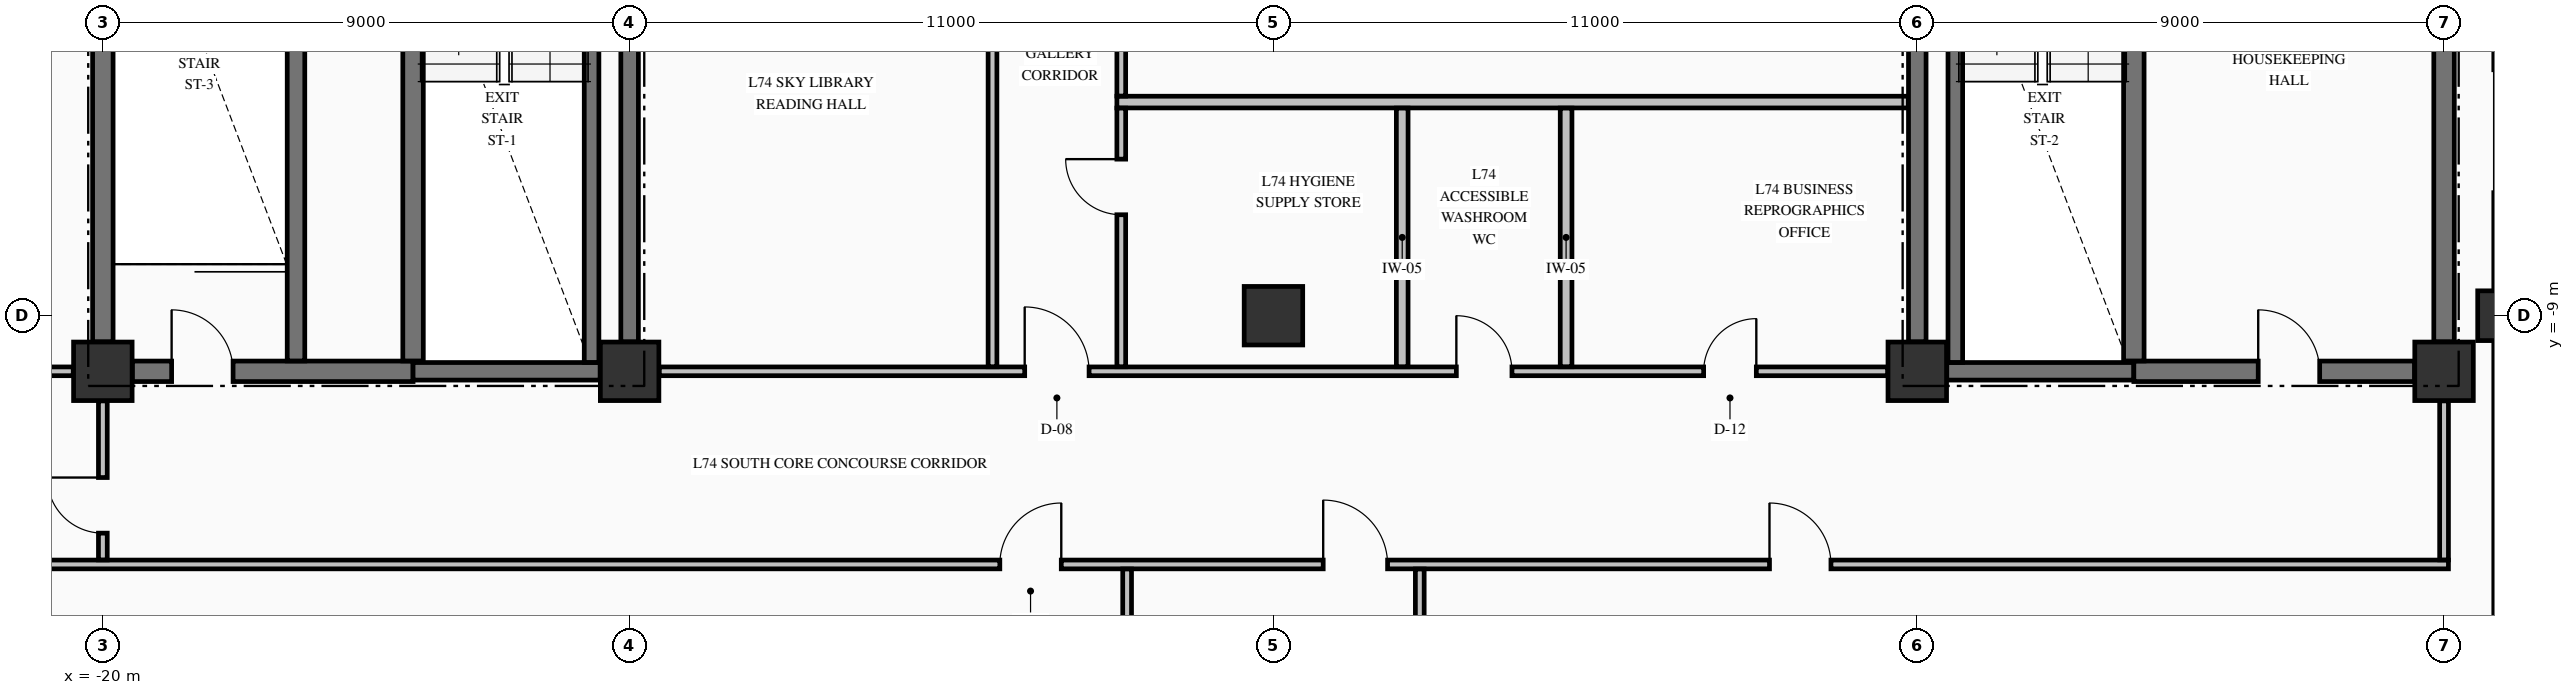
"""IFC4 building model, lengths in metres.
Left out: names, types, materials, properties, quantities, classifications, styles, units other than length and angle.
Written with IfcOpenShell. Run it as: python <this file> out.ifc"""

import sys

from ifc_helpers import new_model, si_unit, direction, frame, frame_2d, origin, origin_2d, place, context, subcontext, project, spatial, rectangle, extrude, element, fill, save


model = new_model("IFC4")
c1 = context("Model", 3, precision=1e-05, world=origin(), true_north=direction((0.0, 1.0)))
c2 = subcontext(c1, "Body", "Model", "MODEL_VIEW")
j1 = project(units=[si_unit("LENGTHUNIT", "METRE"), si_unit("PLANEANGLEUNIT", "RADIAN")], contexts=[c1])
p1 = place(None, origin())
s1 = spatial("IfcSite", under=j1, at=p1, CompositionType="ELEMENT")
p2 = place(p1, origin())
s2 = spatial("IfcBuilding", under=s1, at=p2, CompositionType="ELEMENT")
p3 = place(p2, frame((0.0, 0.0, 278.06)))
s3 = spatial("IfcBuildingStorey", under=s2, at=p3, CompositionType="ELEMENT", Elevation=278.06)
p4 = place(p3, frame((21.0, -9.0, -0.425), z_axis=(0.0, 0.0, 1.0), x_axis=(1.0, 0.0, 0.0)))
e1 = element("IfcColumn", 1, at=p4, inside=s3, PredefinedType="COLUMN", context=c2, shape_type="SweptSolid", body=[
    extrude(rectangle(XDim=0.85, YDim=0.85, at=origin_2d()), origin(), (0.0, 0.0, 1.0), 3.84),
])
for number, where, z_axis, x_axis in (
    (2, (-20.0, -9.95, -0.425), (0.0, 0.0, 1.0), (1.0, 0.0, 0.0)),
    (3, (-11.0, -9.95, -0.425), (0.0, 0.0, 1.0), (1.0, 0.0, 0.0)),
    (4, (11.0, -9.95, -0.425), (0.0, 0.0, 1.0), (1.0, 0.0, 0.0)),
    (5, (20.0, -9.95, -0.425), (0.0, 0.0, 1.0), (1.0, 0.0, 0.0)),
    (6, (0.0, -9.0, -0.425), (0.0, 0.0, 1.0), (1.0, 0.0, 0.0)),
):
    element("IfcColumn", number, at=place(p3, frame(where, z_axis=z_axis, x_axis=x_axis)), inside=s3, PredefinedType="COLUMN", context=c2, shape_type="SweptSolid", body=[
        extrude(rectangle(XDim=1.0, YDim=1.0, at=origin_2d()), origin(), (0.0, 0.0, 1.0), 3.84),
    ])
p5 = place(p3, frame((21.0, -17.545, 0.0), z_axis=(0.0, 0.0, 1.0), x_axis=(0.0, 1.0, 0.0)))
e7 = element("IfcWall", 7, at=p5, inside=s3, PredefinedType="STANDARD", context=c2, shape_type="SweptSolid", body=[
    extrude(rectangle(XDim=8.09, YDim=0.3, at=frame_2d((4.045, 0.0))), origin(), (0.0, 0.0, 1.0), 1.607),
])
p6 = place(p3, frame((21.0, -8.545, 0.0), z_axis=(0.0, 0.0, 1.0), x_axis=(0.0, 1.0, 0.0)))
e8 = element("IfcWall", 8, at=p6, inside=s3, PredefinedType="STANDARD", context=c2, shape_type="SweptSolid", body=[
    extrude(rectangle(XDim=8.09, YDim=0.3, at=frame_2d((4.045, 0.0))), origin(), (0.0, 0.0, 1.0), 2.807),
])
p7 = place(p6, frame((1.647, 0.0, 0.7)))
e9 = element("IfcOpeningElement", 9, at=p7, cuts=e8, PredefinedType="OPENING", context=c2, shape_type="SweptSolid", body=[
    extrude(rectangle(XDim=2.1, YDim=1.5, at=frame_2d((1.05, 0.75))), frame((0.0, 0.16, 0.0), z_axis=(0.0, -1.0, 0.0), x_axis=(1.0, 0.0, 0.0)), (0.0, 0.0, 1.0), 0.32),
])
p8 = place(p6, frame((4.343, 0.0, 0.7)))
e10 = element("IfcOpeningElement", 10, at=p8, cuts=e8, PredefinedType="OPENING", context=c2, shape_type="SweptSolid", body=[
    extrude(rectangle(XDim=2.1, YDim=1.5, at=frame_2d((1.05, 0.75))), frame((0.0, 0.16, 0.0), z_axis=(0.0, -1.0, 0.0), x_axis=(1.0, 0.0, 0.0)), (0.0, 0.0, 1.0), 0.32),
])
p9 = place(p3, frame((-19.496, -9.95, 0.0), z_axis=(0.0, 0.0, 1.0), x_axis=(1.0, 0.0, 0.0)))
e11 = element("IfcWall", 11, at=p9, inside=s3, PredefinedType="SHEAR", context=c2, shape_type="SweptSolid", body=[
    extrude(rectangle(XDim=4.796, YDim=0.35, at=frame_2d((2.398, 0.0))), origin(), (0.0, 0.0, 1.0), 3.415),
])
p10 = place(p9, frame((0.671, 0.0, 0.0)))
e12 = element("IfcOpeningElement", 12, at=p10, cuts=e11, PredefinedType="OPENING", context=c2, shape_type="SweptSolid", body=[
    extrude(rectangle(XDim=1.05, YDim=2.15, at=frame_2d((0.525, 1.075))), frame((0.0, 0.185, 0.0), z_axis=(0.0, -1.0, 0.0), x_axis=(1.0, 0.0, 0.0)), (0.0, 0.0, 1.0), 0.37),
])
for number, where, z_axis, x_axis in (
    (13, (-14.7, -9.95, 0.0), (0.0, 0.0, 1.0), (1.0, 0.0, 0.0)),
    (14, (11.504, -9.95, 0.0), (0.0, 0.0, 1.0), (1.0, 0.0, 0.0)),
):
    element("IfcWall", number, at=place(p3, frame(where, z_axis=z_axis, x_axis=x_axis)), inside=s3, PredefinedType="SHEAR", context=c2, shape_type="SweptSolid", body=[
        extrude(rectangle(XDim=3.196, YDim=0.3, at=frame_2d((1.598, 0.0))), origin(), (0.0, 0.0, 1.0), 3.415),
    ])
p11 = place(p3, frame((14.7, -9.95, 0.0), z_axis=(0.0, 0.0, 1.0), x_axis=(1.0, 0.0, 0.0)))
e15 = element("IfcWall", 15, at=p11, inside=s3, PredefinedType="SHEAR", context=c2, shape_type="SweptSolid", body=[
    extrude(rectangle(XDim=4.796, YDim=0.35, at=frame_2d((2.398, 0.0))), origin(), (0.0, 0.0, 1.0), 3.415),
])
p12 = place(p11, frame((2.125, 0.0, 0.0)))
e16 = element("IfcOpeningElement", 16, at=p12, cuts=e15, PredefinedType="OPENING", context=c2, shape_type="SweptSolid", body=[
    extrude(rectangle(XDim=1.05, YDim=2.15, at=frame_2d((0.525, 1.075))), frame((0.0, 0.185, 0.0), z_axis=(0.0, -1.0, 0.0), x_axis=(1.0, 0.0, 0.0)), (0.0, 0.0, 1.0), 0.37),
])
p13 = place(p3, frame((-25.835, -13.25, 0.0), z_axis=(0.0, 0.0, 1.0), x_axis=(1.0, 0.0, 0.0)))
e17 = element("IfcWall", 17, at=p13, inside=s3, PredefinedType="PARTITIONING", context=c2, shape_type="SweptSolid", body=[
    extrude(rectangle(XDim=45.91, YDim=0.15, at=frame_2d((22.955, 0.0))), origin(), (0.0, 0.0, 1.0), 3.415),
])
p14 = place(p13, frame((26.685, 0.0, 0.0)))
e18 = element("IfcOpeningElement", 18, at=p14, cuts=e17, PredefinedType="OPENING", context=c2, shape_type="SweptSolid", body=[
    extrude(rectangle(XDim=1.1, YDim=2.15, at=frame_2d((0.55, 1.075))), frame((0.0, 0.085, 0.0), z_axis=(0.0, -1.0, 0.0), x_axis=(1.0, 0.0, 0.0)), (0.0, 0.0, 1.0), 0.17),
])
p15 = place(p13, frame((21.16, 0.0, 0.0)))
e19 = element("IfcOpeningElement", 19, at=p15, cuts=e17, PredefinedType="OPENING", context=c2, shape_type="SweptSolid", body=[
    extrude(rectangle(XDim=1.05, YDim=2.15, at=frame_2d((0.525, 1.075))), frame((0.0, 0.085, 0.0), z_axis=(0.0, -1.0, 0.0), x_axis=(1.0, 0.0, 0.0)), (0.0, 0.0, 1.0), 0.17),
])
p16 = place(p13, frame((34.31, 0.0, 0.0)))
e20 = element("IfcOpeningElement", 20, at=p16, cuts=e17, PredefinedType="OPENING", context=c2, shape_type="SweptSolid", body=[
    extrude(rectangle(XDim=1.05, YDim=2.15, at=frame_2d((0.525, 1.075))), frame((0.0, 0.085, 0.0), z_axis=(0.0, -1.0, 0.0), x_axis=(1.0, 0.0, 0.0)), (0.0, 0.0, 1.0), 0.17),
])
p17 = place(p3, frame((-25.835, -9.95, 0.0), z_axis=(0.0, 0.0, 1.0), x_axis=(1.0, 0.0, 0.0)))
e21 = element("IfcWall", 21, at=p17, inside=s3, PredefinedType="PARTITIONING", context=c2, shape_type="SweptSolid", body=[
    extrude(rectangle(XDim=5.329, YDim=0.15, at=frame_2d((2.665, 0.0))), origin(), (0.0, 0.0, 1.0), 3.415),
])
p18 = place(p17, frame((2.36, 0.0, 0.0)))
e22 = element("IfcOpeningElement", 22, at=p18, cuts=e21, PredefinedType="OPENING", context=c2, shape_type="SweptSolid", body=[
    extrude(rectangle(XDim=0.95, YDim=2.15, at=frame_2d((0.475, 1.075))), frame((0.0, 0.085, 0.0), z_axis=(0.0, -1.0, 0.0), x_axis=(1.0, 0.0, 0.0)), (0.0, 0.0, 1.0), 0.17),
])
p19 = place(p3, frame((-10.494, -9.95, 0.0), z_axis=(0.0, 0.0, 1.0), x_axis=(1.0, 0.0, 0.0)))
e23 = element("IfcWall", 23, at=p19, inside=s3, PredefinedType="PARTITIONING", context=c2, shape_type="SweptSolid", body=[
    extrude(rectangle(XDim=20.988, YDim=0.15, at=frame_2d((10.494, 0.0))), origin(), (0.0, 0.0, 1.0), 3.415),
])
p20 = place(p19, frame((6.244, 0.0, 0.0)))
e24 = element("IfcOpeningElement", 24, at=p20, cuts=e23, PredefinedType="OPENING", context=c2, shape_type="SweptSolid", body=[
    extrude(rectangle(XDim=1.1, YDim=2.15, at=frame_2d((0.55, 1.075))), frame((0.0, 0.085, 0.0), z_axis=(0.0, -1.0, 0.0), x_axis=(1.0, 0.0, 0.0)), (0.0, 0.0, 1.0), 0.17),
])
p21 = place(p19, frame((13.619, 0.0, 0.0)))
e25 = element("IfcOpeningElement", 25, at=p21, cuts=e23, PredefinedType="OPENING", context=c2, shape_type="SweptSolid", body=[
    extrude(rectangle(XDim=0.95, YDim=2.15, at=frame_2d((0.475, 1.075))), frame((0.0, 0.085, 0.0), z_axis=(0.0, -1.0, 0.0), x_axis=(1.0, 0.0, 0.0)), (0.0, 0.0, 1.0), 0.17),
])
p22 = place(p19, frame((17.844, 0.0, 0.0)))
e26 = element("IfcOpeningElement", 26, at=p22, cuts=e23, PredefinedType="OPENING", context=c2, shape_type="SweptSolid", body=[
    extrude(rectangle(XDim=0.9, YDim=2.15, at=frame_2d((0.45, 1.075))), frame((0.0, 0.085, 0.0), z_axis=(0.0, -1.0, 0.0), x_axis=(1.0, 0.0, 0.0)), (0.0, 0.0, 1.0), 0.17),
])
p23 = place(p3, frame((-2.675, -5.35, 0.0), z_axis=(0.0, 0.0, 1.0), x_axis=(1.0, 0.0, 0.0)))
e27 = element("IfcWall", 27, at=p23, inside=s3, PredefinedType="PARTITIONING", context=c2, shape_type="SweptSolid", body=[
    extrude(rectangle(XDim=13.522, YDim=0.2, at=frame_2d((6.761, 0.0))), origin(), (0.0, 0.0, 1.0), 3.415),
])
p24 = place(p3, frame((-20.0, -9.446, 0.0), z_axis=(0.0, 0.0, 1.0), x_axis=(0.0, 1.0, 0.0)))
e28 = element("IfcWall", 28, at=p24, inside=s3, PredefinedType="SHEAR", context=c2, shape_type="SweptSolid", body=[
    extrude(rectangle(XDim=8.942, YDim=0.35, at=frame_2d((4.471, 0.0))), origin(), (0.0, 0.0, 1.0), 3.415),
])
p25 = place(p3, frame((-16.7, -9.773, 0.0), z_axis=(0.0, 0.0, 1.0), x_axis=(0.0, 1.0, 0.0)))
e29 = element("IfcWall", 29, at=p25, inside=s3, PredefinedType="SHEAR", context=c2, shape_type="SweptSolid", body=[
    extrude(rectangle(XDim=9.371, YDim=0.3, at=frame_2d((4.686, 0.0))), origin(), (0.0, 0.0, 1.0), 3.415),
])
p26 = place(p3, frame((-14.7, -9.773, 0.0), z_axis=(0.0, 0.0, 1.0), x_axis=(0.0, 1.0, 0.0)))
e30 = element("IfcWall", 30, at=p26, inside=s3, PredefinedType="SHEAR", context=c2, shape_type="SweptSolid", body=[
    extrude(rectangle(XDim=9.371, YDim=0.35, at=frame_2d((4.686, 0.0))), origin(), (0.0, 0.0, 1.0), 3.415),
])
p27 = place(p3, frame((-11.65, -9.798, 0.0), z_axis=(0.0, 0.0, 1.0), x_axis=(0.0, 1.0, 0.0)))
e31 = element("IfcWall", 31, at=p27, inside=s3, PredefinedType="SOLIDWALL", context=c2, shape_type="SweptSolid", body=[
    extrude(rectangle(XDim=9.396, YDim=0.25, at=frame_2d((4.698, 0.0))), origin(), (0.0, 0.0, 1.0), 3.415),
])
for number, where, z_axis, x_axis in (
    (32, (-11.0, -9.446, 0.0), (0.0, 0.0, 1.0), (0.0, 1.0, 0.0)),
    (33, (11.0, -9.446, 0.0), (0.0, 0.0, 1.0), (0.0, 1.0, 0.0)),
):
    element("IfcWall", number, at=place(p3, frame(where, z_axis=z_axis, x_axis=x_axis)), inside=s3, PredefinedType="SHEAR", context=c2, shape_type="SweptSolid", body=[
        extrude(rectangle(XDim=8.942, YDim=0.3, at=frame_2d((4.471, 0.0))), origin(), (0.0, 0.0, 1.0), 3.415),
    ])
p28 = place(p3, frame((11.65, -9.798, 0.0), z_axis=(0.0, 0.0, 1.0), x_axis=(0.0, 1.0, 0.0)))
e34 = element("IfcWall", 34, at=p28, inside=s3, PredefinedType="SOLIDWALL", context=c2, shape_type="SweptSolid", body=[
    extrude(rectangle(XDim=9.396, YDim=0.25, at=frame_2d((4.698, 0.0))), origin(), (0.0, 0.0, 1.0), 3.415),
])
p29 = place(p3, frame((14.7, -9.773, 0.0), z_axis=(0.0, 0.0, 1.0), x_axis=(0.0, 1.0, 0.0)))
e35 = element("IfcWall", 35, at=p29, inside=s3, PredefinedType="SHEAR", context=c2, shape_type="SweptSolid", body=[
    extrude(rectangle(XDim=9.371, YDim=0.35, at=frame_2d((4.686, 0.0))), origin(), (0.0, 0.0, 1.0), 3.415),
])
p30 = place(p3, frame((20.0, -9.446, 0.0), z_axis=(0.0, 0.0, 1.0), x_axis=(0.0, 1.0, 0.0)))
e36 = element("IfcWall", 36, at=p30, inside=s3, PredefinedType="SHEAR", context=c2, shape_type="SweptSolid", body=[
    extrude(rectangle(XDim=14.619, YDim=0.35, at=frame_2d((7.31, 0.0))), origin(), (0.0, 0.0, 1.0), 3.415),
])
p31 = place(p3, frame((-20.0, -13.172, 0.0), z_axis=(0.0, 0.0, 1.0), x_axis=(0.0, 1.0, 0.0)))
e37 = element("IfcWall", 37, at=p31, inside=s3, PredefinedType="PARTITIONING", context=c2, shape_type="SweptSolid", body=[
    extrude(rectangle(XDim=2.716, YDim=0.15, at=frame_2d((1.358, 0.0))), origin(), (0.0, 0.0, 1.0), 3.415),
])
p32 = place(p31, frame((0.457, 0.0, 0.0)))
e38 = element("IfcOpeningElement", 38, at=p32, cuts=e37, PredefinedType="OPENING", context=c2, shape_type="SweptSolid", body=[
    extrude(rectangle(XDim=0.95, YDim=2.15, at=frame_2d((0.475, 1.075))), frame((0.0, 0.085, 0.0), z_axis=(0.0, -1.0, 0.0), x_axis=(1.0, 0.0, 0.0)), (0.0, 0.0, 1.0), 0.17),
])
p33 = place(p3, frame((-4.8, -9.872, 0.0), z_axis=(0.0, 0.0, 1.0), x_axis=(0.0, 1.0, 0.0)))
e39 = element("IfcWall", 39, at=p33, inside=s3, PredefinedType="PARTITIONING", context=c2, shape_type="SweptSolid", body=[
    extrude(rectangle(XDim=9.544, YDim=0.15, at=frame_2d((4.772, 0.0))), origin(), (0.0, 0.0, 1.0), 3.415),
])
p34 = place(p3, frame((-2.6, -9.872, 0.0), z_axis=(0.0, 0.0, 1.0), x_axis=(0.0, 1.0, 0.0)))
e40 = element("IfcWall", 40, at=p34, inside=s3, PredefinedType="PARTITIONING", context=c2, shape_type="SweptSolid", body=[
    extrude(rectangle(XDim=4.419, YDim=0.15, at=frame_2d((2.209, 0.0))), origin(), (0.0, 0.0, 1.0), 3.415),
])
p35 = place(p34, frame((2.597, 0.0, 0.0)))
e41 = element("IfcOpeningElement", 41, at=p35, cuts=e40, PredefinedType="OPENING", context=c2, shape_type="SweptSolid", body=[
    extrude(rectangle(XDim=0.95, YDim=2.15, at=frame_2d((0.475, 1.075))), frame((0.0, 0.085, 0.0), z_axis=(0.0, -1.0, 0.0), x_axis=(1.0, 0.0, 0.0)), (0.0, 0.0, 1.0), 0.17),
])
p36 = place(p3, frame((-2.6, -5.247, 0.0), z_axis=(0.0, 0.0, 1.0), x_axis=(0.0, 1.0, 0.0)))
e42 = element("IfcWall", 42, at=p36, inside=s3, PredefinedType="PARTITIONING", context=c2, shape_type="SweptSolid", body=[
    extrude(rectangle(XDim=4.919, YDim=0.15, at=frame_2d((2.459, 0.0))), origin(), (0.0, 0.0, 1.0), 3.415),
])
p37 = place(p3, frame((-2.5, -18.272, 0.0), z_axis=(0.0, 0.0, 1.0), x_axis=(0.0, 1.0, 0.0)))
e43 = element("IfcWall", 43, at=p37, inside=s3, PredefinedType="PARTITIONING", context=c2, shape_type="SweptSolid", body=[
    extrude(rectangle(XDim=4.944, YDim=0.15, at=frame_2d((2.472, 0.0))), origin(), (0.0, 0.0, 1.0), 3.415),
])
p38 = place(p3, frame((2.2, -9.872, 0.0), z_axis=(0.0, 0.0, 1.0), x_axis=(0.0, 1.0, 0.0)))
e44 = element("IfcWall", 44, at=p38, inside=s3, PredefinedType="PARTITIONING", context=c2, shape_type="SweptSolid", body=[
    extrude(rectangle(XDim=4.419, YDim=0.2, at=frame_2d((2.209, 0.0))), origin(), (0.0, 0.0, 1.0), 3.415),
])
p39 = place(p3, frame((2.5, -18.272, 0.0), z_axis=(0.0, 0.0, 1.0), x_axis=(0.0, 1.0, 0.0)))
e45 = element("IfcWall", 45, at=p39, inside=s3, PredefinedType="PARTITIONING", context=c2, shape_type="SweptSolid", body=[
    extrude(rectangle(XDim=4.944, YDim=0.15, at=frame_2d((2.472, 0.0))), origin(), (0.0, 0.0, 1.0), 3.415),
])
p40 = place(p3, frame((5.0, -9.872, 0.0), z_axis=(0.0, 0.0, 1.0), x_axis=(0.0, 1.0, 0.0)))
e46 = element("IfcWall", 46, at=p40, inside=s3, PredefinedType="PARTITIONING", context=c2, shape_type="SweptSolid", body=[
    extrude(rectangle(XDim=4.419, YDim=0.2, at=frame_2d((2.209, 0.0))), origin(), (0.0, 0.0, 1.0), 3.415),
])
p41 = place(p3, frame((20.0, -13.172, 0.0), z_axis=(0.0, 0.0, 1.0), x_axis=(0.0, 1.0, 0.0)))
e47 = element("IfcWall", 47, at=p41, inside=s3, PredefinedType="PARTITIONING", context=c2, shape_type="SweptSolid", body=[
    extrude(rectangle(XDim=2.716, YDim=0.15, at=frame_2d((1.358, 0.0))), origin(), (0.0, 0.0, 1.0), 3.005),
])
p42 = place(p10, origin())
e48 = element("IfcDoor", 48, at=p42, inside=s3, OperationType="SINGLE_SWING_LEFT", PredefinedType="DOOR", context=c2, shape_type="SweptSolid", body=[
    extrude(rectangle(XDim=1.05, YDim=2.15, at=frame_2d((0.525, 1.075))), frame((0.0, 0.025, 0.0), z_axis=(0.0, -1.0, 0.0), x_axis=(1.0, 0.0, 0.0)), (0.0, 0.0, 1.0), 0.05),
])
fill(e12, e48)
p43 = place(p12, origin())
e49 = element("IfcDoor", 49, at=p43, inside=s3, OperationType="SINGLE_SWING_LEFT", PredefinedType="DOOR", context=c2, shape_type="SweptSolid", body=[
    extrude(rectangle(XDim=1.05, YDim=2.15, at=frame_2d((0.525, 1.075))), frame((0.0, 0.025, 0.0), z_axis=(0.0, -1.0, 0.0), x_axis=(1.0, 0.0, 0.0)), (0.0, 0.0, 1.0), 0.05),
])
fill(e16, e49)
p44 = place(p20, origin())
e50 = element("IfcDoor", 50, at=p44, inside=s3, OperationType="SINGLE_SWING_LEFT", PredefinedType="DOOR", context=c2, shape_type="SweptSolid", body=[
    extrude(rectangle(XDim=1.1, YDim=2.15, at=frame_2d((0.55, 1.075))), frame((0.0, 0.025, 0.0), z_axis=(0.0, -1.0, 0.0), x_axis=(1.0, 0.0, 0.0)), (0.0, 0.0, 1.0), 0.05),
])
fill(e24, e50)
p45 = place(p14, origin())
e51 = element("IfcDoor", 51, at=p45, inside=s3, OperationType="SINGLE_SWING_LEFT", PredefinedType="DOOR", context=c2, shape_type="SweptSolid", body=[
    extrude(rectangle(XDim=1.1, YDim=2.15, at=frame_2d((0.55, 1.075))), frame((0.0, 0.025, 0.0), z_axis=(0.0, -1.0, 0.0), x_axis=(1.0, 0.0, 0.0)), (0.0, 0.0, 1.0), 0.05),
])
fill(e18, e51)
p46 = place(p15, origin())
e52 = element("IfcDoor", 52, at=p46, inside=s3, OperationType="SINGLE_SWING_RIGHT", PredefinedType="DOOR", context=c2, shape_type="SweptSolid", body=[
    extrude(rectangle(XDim=1.05, YDim=2.15, at=frame_2d((0.525, 1.075))), frame((0.0, 0.025, 0.0), z_axis=(0.0, -1.0, 0.0), x_axis=(1.0, 0.0, 0.0)), (0.0, 0.0, 1.0), 0.05),
])
fill(e19, e52)
p47 = place(p16, origin())
e53 = element("IfcDoor", 53, at=p47, inside=s3, OperationType="SINGLE_SWING_LEFT", PredefinedType="DOOR", context=c2, shape_type="SweptSolid", body=[
    extrude(rectangle(XDim=1.05, YDim=2.15, at=frame_2d((0.525, 1.075))), frame((0.0, 0.025, 0.0), z_axis=(0.0, -1.0, 0.0), x_axis=(1.0, 0.0, 0.0)), (0.0, 0.0, 1.0), 0.05),
])
fill(e20, e53)
p48 = place(p35, origin())
e54 = element("IfcDoor", 54, at=p48, inside=s3, OperationType="SINGLE_SWING_RIGHT", PredefinedType="DOOR", context=c2, shape_type="SweptSolid", body=[
    extrude(rectangle(XDim=0.95, YDim=2.15, at=frame_2d((0.475, 1.075))), frame((0.0, 0.025, 0.0), z_axis=(0.0, -1.0, 0.0), x_axis=(1.0, 0.0, 0.0)), (0.0, 0.0, 1.0), 0.05),
])
fill(e41, e54)
p49 = place(p21, origin())
e55 = element("IfcDoor", 55, at=p49, inside=s3, OperationType="SINGLE_SWING_LEFT", PredefinedType="DOOR", context=c2, shape_type="SweptSolid", body=[
    extrude(rectangle(XDim=0.95, YDim=2.15, at=frame_2d((0.475, 1.075))), frame((0.0, 0.025, 0.0), z_axis=(0.0, -1.0, 0.0), x_axis=(1.0, 0.0, 0.0)), (0.0, 0.0, 1.0), 0.05),
])
fill(e25, e55)
p50 = place(p22, origin())
e56 = element("IfcDoor", 56, at=p50, inside=s3, OperationType="SINGLE_SWING_RIGHT", PredefinedType="DOOR", context=c2, shape_type="SweptSolid", body=[
    extrude(rectangle(XDim=0.9, YDim=2.15, at=frame_2d((0.45, 1.075))), frame((0.0, 0.025, 0.0), z_axis=(0.0, -1.0, 0.0), x_axis=(1.0, 0.0, 0.0)), (0.0, 0.0, 1.0), 0.05),
])
fill(e26, e56)
p51 = place(p32, origin())
e57 = element("IfcDoor", 57, at=p51, inside=s3, OperationType="SINGLE_SWING_RIGHT", PredefinedType="DOOR", context=c2, shape_type="SweptSolid", body=[
    extrude(rectangle(XDim=0.95, YDim=2.15, at=frame_2d((0.475, 1.075))), frame((0.0, 0.025, 0.0), z_axis=(0.0, -1.0, 0.0), x_axis=(1.0, 0.0, 0.0)), (0.0, 0.0, 1.0), 0.05),
])
fill(e38, e57)
save(model, sys.argv[1])
